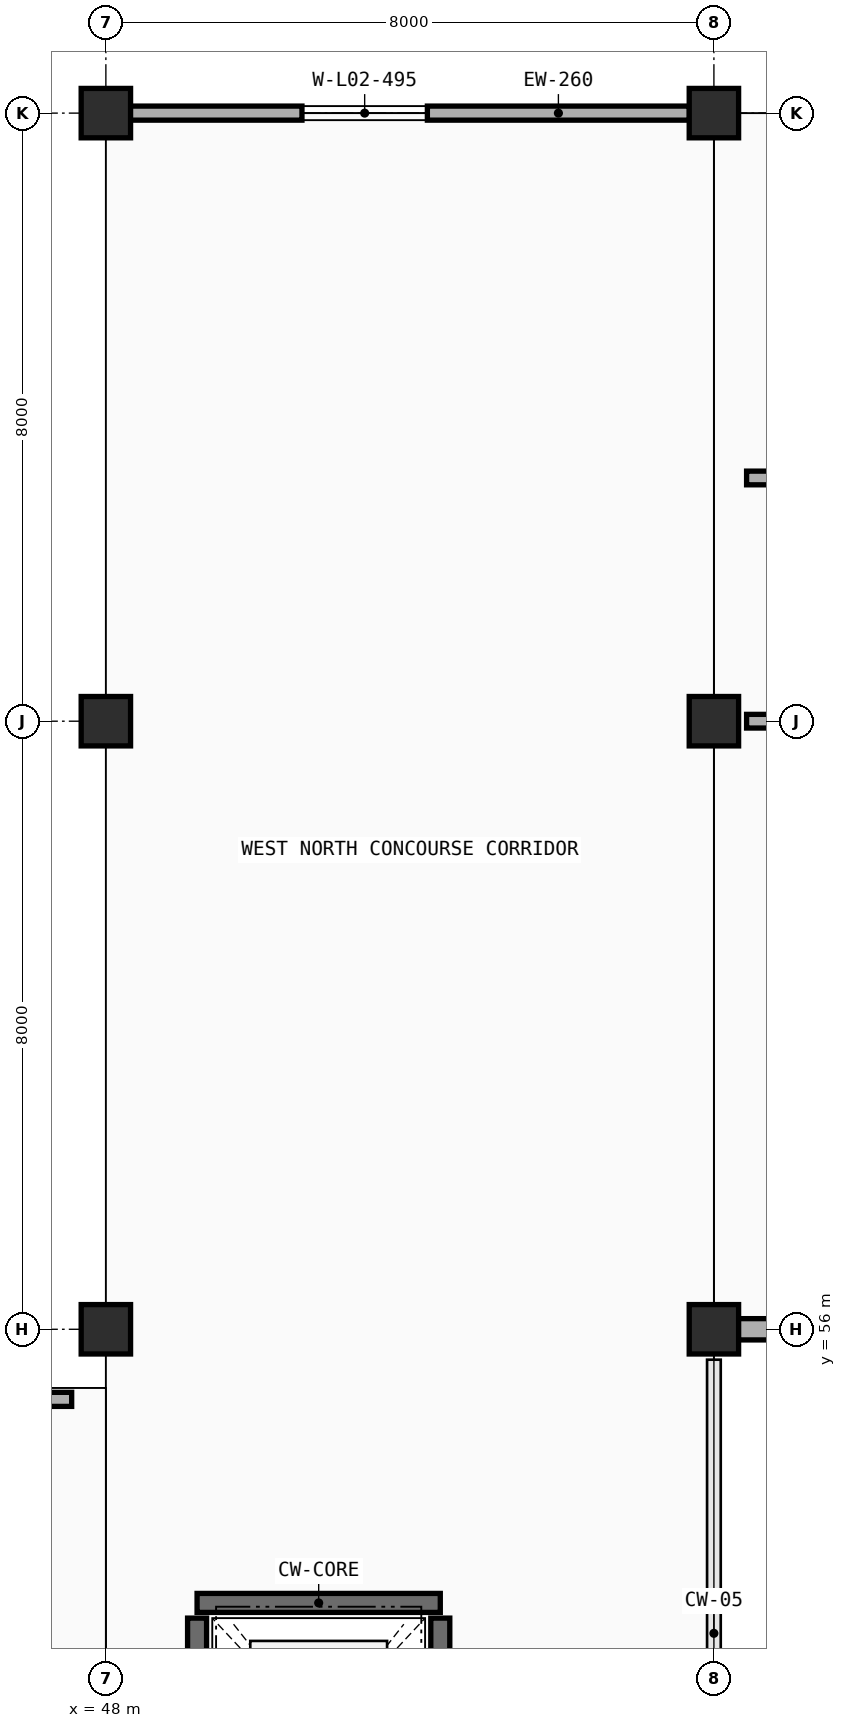
"""IFC4 building model, lengths in metres.
Left out: names, types, materials, properties, quantities, classifications, styles, units other than length and angle.
Written with IfcOpenShell. Run it as: python <this file> out.ifc"""

import sys

from ifc_helpers import new_model, si_unit, direction, frame, frame_2d, origin, origin_2d, place, context, subcontext, project, spatial, rectangle, extrude, element, fill, save


model = new_model("IFC4")
c1 = context("Model", 3, precision=1e-05, world=origin(), true_north=direction((0.0, 1.0)))
c2 = subcontext(c1, "Body", "Model", "MODEL_VIEW")
j1 = project(units=[si_unit("LENGTHUNIT", "METRE"), si_unit("PLANEANGLEUNIT", "RADIAN")], contexts=[c1])
p1 = place(None, origin())
s1 = spatial("IfcSite", under=j1, at=p1, CompositionType="ELEMENT")
p2 = place(p1, origin())
s2 = spatial("IfcBuilding", under=s1, at=p2, CompositionType="ELEMENT")
p3 = place(p2, frame((0.0, 0.0, 4.8)))
s3 = spatial("IfcBuildingStorey", under=s2, at=p3, CompositionType="ELEMENT", Elevation=4.8)
for number, where, z_axis, x_axis in (
    (1, (48.0, 56.0, 0.0), (0.0, 0.0, 1.0), (1.0, 0.0, 0.0)),
    (2, (56.0, 56.0, 0.0), (0.0, 0.0, 1.0), (1.0, 0.0, 0.0)),
    (3, (48.0, 64.0, 0.0), (0.0, 0.0, 1.0), (1.0, 0.0, 0.0)),
    (4, (56.0, 64.0, 0.0), (0.0, 0.0, 1.0), (1.0, 0.0, 0.0)),
    (5, (48.0, 72.0, 0.0), (0.0, 0.0, 1.0), (1.0, 0.0, 0.0)),
    (6, (56.0, 72.0, 0.0), (0.0, 0.0, 1.0), (1.0, 0.0, 0.0)),
):
    element("IfcColumn", number, at=place(p3, frame(where, z_axis=z_axis, x_axis=x_axis)), inside=s3, PredefinedType="COLUMN", context=c2, shape_type="SweptSolid", body=[
        extrude(rectangle(XDim=0.65, YDim=0.65, at=origin_2d()), origin(), (0.0, 0.0, 1.0), 4.8),
    ])
p4 = place(p3, frame((63.653, 56.0, 0.0), z_axis=(0.0, 0.0, 1.0), x_axis=(-1.0, 0.0, 0.0)))
e7 = element("IfcWall", 7, at=p4, inside=s3, PredefinedType="STANDARD", context=c2, shape_type="SweptSolid", body=[
    extrude(rectangle(XDim=7.331, YDim=0.28, at=frame_2d((3.666, 0.0))), origin(), (0.0, 0.0, 1.0), 3.91),
])
p5 = place(p4, frame((2.233, 0.0, 0.9)))
e8 = element("IfcOpeningElement", 8, at=p5, cuts=e7, PredefinedType="OPENING", context=c2, shape_type="SweptSolid", body=[
    extrude(rectangle(XDim=2.85, YDim=1.85, at=frame_2d((1.425, 0.925))), frame((0.0, 0.15, 0.0), z_axis=(0.0, -1.0, 0.0), x_axis=(1.0, 0.0, 0.0)), (0.0, 0.0, 1.0), 0.3),
])
p6 = place(p3, frame((48.322, 72.0, 0.0), z_axis=(0.0, 0.0, 1.0), x_axis=(1.0, 0.0, 0.0)))
e9 = element("IfcWall", 9, at=p6, inside=s3, PredefinedType="STANDARD", context=c2, shape_type="SweptSolid", body=[
    extrude(rectangle(XDim=7.356, YDim=0.185, at=frame_2d((3.678, 0.0))), origin(), (0.0, 0.0, 1.0), 3.91),
])
p7 = place(p6, frame((2.258, 0.0, 0.9)))
e10 = element("IfcOpeningElement", 10, at=p7, cuts=e9, PredefinedType="OPENING", context=c2, shape_type="SweptSolid", body=[
    extrude(rectangle(XDim=1.65, YDim=1.85, at=frame_2d((0.825, 0.925))), frame((0.0, 0.103, 0.0), z_axis=(0.0, -1.0, 0.0), x_axis=(1.0, 0.0, 0.0)), (0.0, 0.0, 1.0), 0.205),
])
p8 = place(p3, frame((42.372, 55.078, 0.0), z_axis=(0.0, 0.0, 1.0), x_axis=(1.0, 0.0, 0.0)))
e11 = element("IfcWall", 11, at=p8, inside=s3, PredefinedType="STANDARD", context=c2, shape_type="SweptSolid", body=[
    extrude(rectangle(XDim=5.178, YDim=0.185, at=frame_2d((2.589, 0.0))), origin(), (0.0, 0.0, 1.0), 3.925),
])
p9 = place(p8, frame((1.878, 0.0, 0.9)))
e12 = element("IfcOpeningElement", 12, at=p9, cuts=e11, PredefinedType="OPENING", context=c2, shape_type="SweptSolid", body=[
    extrude(rectangle(XDim=1.25, YDim=1.25, at=frame_2d((0.625, 0.625))), frame((0.0, 0.103, 0.0), z_axis=(0.0, -1.0, 0.0), x_axis=(1.0, 0.0, 0.0)), (0.0, 0.0, 1.0), 0.205),
])
p10 = place(p3, frame((48.1, 87.78, 0.0), z_axis=(0.0, 0.0, 1.0), x_axis=(0.0, -1.0, 0.0)))
e13 = element("IfcWall", 13, at=p10, inside=s3, PredefinedType="PARAPET", context=c2, shape_type="SweptSolid", body=[
    extrude(rectangle(XDim=15.56, YDim=0.2, at=frame_2d((7.78, 0.0))), origin(), (0.0, 0.0, 1.0), 1.15),
])
p11 = place(p3, frame((49.2, 52.4, 0.0), z_axis=(0.0, 0.0, 1.0), x_axis=(1.0, 0.0, 0.0)))
e14 = element("IfcWall", 14, at=p11, inside=s3, PredefinedType="SOLIDWALL", context=c2, shape_type="SweptSolid", body=[
    extrude(rectangle(XDim=3.2, YDim=0.25, at=frame_2d((1.6, 0.0))), origin(), (0.0, 0.0, 1.0), 4.8),
])
for number, where, z_axis, x_axis in (
    (15, (49.2, 49.2, 0.0), (0.0, 0.0, 1.0), (0.0, 1.0, 0.0)),
    (16, (52.4, 49.2, 0.0), (0.0, 0.0, 1.0), (0.0, 1.0, 0.0)),
):
    element("IfcWall", number, at=place(p3, frame(where, z_axis=z_axis, x_axis=x_axis)), inside=s3, PredefinedType="SOLIDWALL", context=c2, shape_type="SweptSolid", body=[
        extrude(rectangle(XDim=3.0, YDim=0.25, at=frame_2d((1.5, 0.0))), origin(), (0.0, 0.0, 1.0), 4.8),
    ])
p12 = place(p3, frame((56.43, 64.0, 0.0), z_axis=(0.0, 0.0, 1.0), x_axis=(1.0, 0.0, 0.0)))
e17 = element("IfcWall", 17, at=p12, inside=s3, PredefinedType="PARTITIONING", context=c2, shape_type="SweptSolid", body=[
    extrude(rectangle(XDim=15.14, YDim=0.18, at=frame_2d((7.57, 0.0))), origin(), (0.0, 0.0, 1.0), 3.86),
])
p13 = place(p12, frame((2.85, 0.0, 0.0)))
e18 = element("IfcOpeningElement", 18, at=p13, cuts=e17, PredefinedType="OPENING", context=c2, shape_type="SweptSolid", body=[
    extrude(rectangle(XDim=1.44, YDim=2.2, at=frame_2d((0.72, 1.1))), frame((0.0, 0.1, 0.0), z_axis=(0.0, -1.0, 0.0), x_axis=(1.0, 0.0, 0.0)), (0.0, 0.0, 1.0), 0.2),
])
p14 = place(p3, frame((56.43, 67.2, 0.0), z_axis=(0.0, 0.0, 1.0), x_axis=(1.0, 0.0, 0.0)))
e19 = element("IfcWall", 19, at=p14, inside=s3, PredefinedType="PARTITIONING", context=c2, shape_type="SweptSolid", body=[
    extrude(rectangle(XDim=31.14, YDim=0.18, at=frame_2d((15.57, 0.0))), origin(), (0.0, 0.0, 1.0), 3.9),
])
p15 = place(p14, frame((2.96, 0.0, 0.0)))
e20 = element("IfcOpeningElement", 20, at=p15, cuts=e19, PredefinedType="OPENING", context=c2, shape_type="SweptSolid", body=[
    extrude(rectangle(XDim=1.22, YDim=2.18, at=frame_2d((0.61, 1.09))), frame((0.0, 0.1, 0.0), z_axis=(0.0, -1.0, 0.0), x_axis=(1.0, 0.0, 0.0)), (0.0, 0.0, 1.0), 0.2),
])
p16 = place(p7, origin())
e21 = element("IfcWindow", 21, at=p16, inside=s3, PartitioningType="DOUBLE_PANEL_VERTICAL", PredefinedType="WINDOW", context=c2, shape_type="SweptSolid", body=[
    extrude(rectangle(XDim=1.65, YDim=1.85, at=frame_2d((0.825, 0.925))), frame((0.0, 0.03, 0.0), z_axis=(0.0, -1.0, 0.0), x_axis=(1.0, 0.0, 0.0)), (0.0, 0.0, 1.0), 0.06),
])
fill(e10, e21)
save(model, sys.argv[1])
